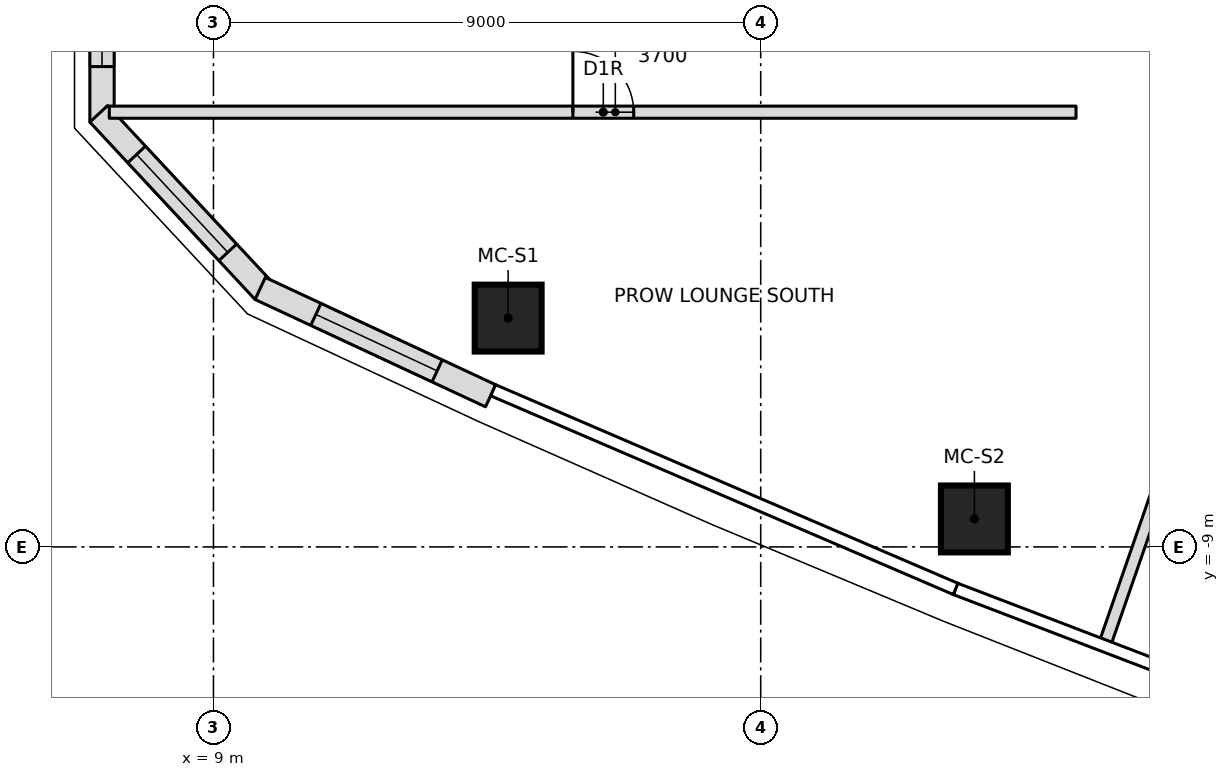
"""IFC4 building model, lengths in metres.
Left out: names, types, materials, properties, quantities, classifications, styles, units other than length and angle.
Written with IfcOpenShell. Run it as: python <this file> out.ifc"""

import sys

from ifc_helpers import new_model, si_unit, direction, frame, frame_2d, origin, origin_2d, place, context, subcontext, project, spatial, polyline, rectangle, outline, extrude, element, fill, save


model = new_model("IFC4")
c1 = context("Model", 3, precision=1e-05, world=origin(), true_north=direction((0.0, 1.0)))
c2 = subcontext(c1, "Body", "Model", "MODEL_VIEW")
j1 = project(units=[si_unit("LENGTHUNIT", "METRE"), si_unit("PLANEANGLEUNIT", "RADIAN")], contexts=[c1])
p1 = place(None, origin())
s1 = spatial("IfcSite", under=j1, at=p1, CompositionType="ELEMENT")
p2 = place(p1, origin())
s2 = spatial("IfcBuilding", under=s1, at=p2, CompositionType="ELEMENT")
p3 = place(p2, frame((0.0, 0.0, 292.75)))
s3 = spatial("IfcBuildingStorey", under=s2, at=p3, CompositionType="ELEMENT", Elevation=292.75)
for number, where, z_axis, x_axis in (
    (1, (13.846, -5.237, 0.0), (0.0, 0.0, 1.0), (1.0, 0.0, 0.0)),
    (2, (21.514, -8.54, 0.0), (0.0, 0.0, 1.0), (1.0, 0.0, 0.0)),
):
    element("IfcColumn", number, at=place(p3, frame(where, z_axis=z_axis, x_axis=x_axis)), inside=s3, PredefinedType="COLUMN", context=c2, shape_type="SweptSolid", body=[
        extrude(rectangle(XDim=1.1, YDim=1.1, at=origin_2d()), origin(), (0.0, 0.0, 1.0), 3.55),
    ])
p4 = place(p3, frame((7.167, 1.935, 0.0), z_axis=(0.0, 0.0, 1.0), x_axis=(0.0, -1.0, 0.0)))
e3 = element("IfcWall", 3, at=p4, inside=s3, PredefinedType="NOTDEFINED", context=c2, shape_type="SweptSolid", body=[
    extrude(outline(polyline([(-0.079, -0.2), (3.948, -0.2), (3.791, 0.2), (0.079, 0.2), (-0.079, -0.2)])), origin(), (0.0, 0.0, 1.0), 3.25),
])
p5 = place(p4, frame((0.835, 0.0, 0.6)))
e4 = element("IfcOpeningElement", 4, at=p5, cuts=e3, PredefinedType="OPENING", context=c2, shape_type="SweptSolid", body=[
    extrude(outline(polyline([(0.0, 1.35), (0.084, 1.771), (0.322, 2.128), (0.679, 2.366), (1.1, 2.45), (1.521, 2.366), (1.878, 2.128), (2.116, 1.771), (2.2, 1.35), (2.2, 1.1), (2.116, 0.679), (1.878, 0.322), (1.521, 0.084), (1.1, 0.0), (0.679, 0.084), (0.322, 0.322), (0.084, 0.679), (0.0, 1.1), (0.0, 1.35)])), frame((0.0, 0.21, 0.0), z_axis=(0.0, -1.0, 0.0), x_axis=(1.0, 0.0, 0.0)), (0.0, 0.0, 1.0), 0.42),
])
p6 = place(p3, frame((7.167, -1.935, 0.0), z_axis=(0.0, 0.0, 1.0), x_axis=(0.6815467277, -0.73177459505, 0.0)))
e5 = element("IfcWall", 5, at=p6, inside=s3, PredefinedType="NOTDEFINED", context=c2, shape_type="SweptSolid", body=[
    extrude(outline(polyline([(-0.079, -0.2), (3.908, -0.2), (3.83, 0.2), (0.079, 0.2), (-0.079, -0.2)])), origin(), (0.0, 0.0, 1.0), 3.25),
])
p7 = place(p6, frame((0.835, 0.0, 0.6)))
e6 = element("IfcOpeningElement", 6, at=p7, cuts=e5, PredefinedType="OPENING", context=c2, shape_type="SweptSolid", body=[
    extrude(outline(polyline([(0.0, 1.35), (0.084, 1.771), (0.322, 2.128), (0.679, 2.366), (1.1, 2.45), (1.521, 2.366), (1.878, 2.128), (2.116, 1.771), (2.2, 1.35), (2.2, 1.1), (2.116, 0.679), (1.878, 0.322), (1.521, 0.084), (1.1, 0.0), (0.679, 0.084), (0.322, 0.322), (0.084, 0.679), (0.0, 1.1), (0.0, 1.35)])), frame((0.0, 0.21, 0.0), z_axis=(0.0, -1.0, 0.0), x_axis=(1.0, 0.0, 0.0)), (0.0, 0.0, 1.0), 0.42),
])
p8 = place(p3, frame((9.804, -4.766, 0.0), z_axis=(0.0, 0.0, 1.0), x_axis=(0.906485602396, -0.42223672584, 0.0)))
e7 = element("IfcWall", 7, at=p8, inside=s3, PredefinedType="NOTDEFINED", context=c2, shape_type="SweptSolid", body=[
    extrude(outline(polyline([(-0.039, -0.2), (4.142, -0.2), (4.142, 0.2), (0.039, 0.2), (-0.039, -0.2)])), origin(), (0.0, 0.0, 1.0), 3.25),
])
p9 = place(p8, frame((0.971, 0.0, 0.6)))
e8 = element("IfcOpeningElement", 8, at=p9, cuts=e7, PredefinedType="OPENING", context=c2, shape_type="SweptSolid", body=[
    extrude(outline(polyline([(0.0, 1.35), (0.084, 1.771), (0.322, 2.128), (0.679, 2.366), (1.1, 2.45), (1.521, 2.366), (1.878, 2.128), (2.116, 1.771), (2.2, 1.35), (2.2, 1.1), (2.116, 0.679), (1.878, 0.322), (1.521, 0.084), (1.1, 0.0), (0.679, 0.084), (0.322, 0.322), (0.084, 0.679), (0.0, 1.1), (0.0, 1.35)])), frame((0.0, 0.21, 0.0), z_axis=(0.0, -1.0, 0.0), x_axis=(1.0, 0.0, 0.0)), (0.0, 0.0, 1.0), 0.42),
])
p10 = place(p3, frame((7.287, -1.85, 0.0), z_axis=(0.0, 0.0, 1.0), x_axis=(1.0, 0.0, 0.0)))
e9 = element("IfcWall", 9, at=p10, inside=s3, PredefinedType="PARTITIONING", context=c2, shape_type="SweptSolid", body=[
    extrude(rectangle(XDim=15.899, YDim=0.2, at=frame_2d((7.949, 0.0))), origin(), (0.0, 0.0, 1.0), 3.25),
])
p11 = place(p10, frame((7.624, 0.0, 0.0)))
e10 = element("IfcOpeningElement", 10, at=p11, cuts=e9, PredefinedType="OPENING", context=c2, shape_type="SweptSolid", body=[
    extrude(rectangle(XDim=1.0, YDim=2.1, at=frame_2d((0.5, 1.05))), frame((0.0, 0.11, 0.0), z_axis=(0.0, -1.0, 0.0), x_axis=(1.0, 0.0, 0.0)), (0.0, 0.0, 1.0), 0.22),
])
p12 = place(p3, frame((23.668, -10.573, 0.0), z_axis=(0.0, 0.0, 1.0), x_axis=(0.327714422317, 0.944776829418, 0.0)))
e11 = element("IfcWall", 11, at=p12, inside=s3, PredefinedType="PARTITIONING", context=c2, shape_type="SweptSolid", body=[
    extrude(rectangle(XDim=9.233, YDim=0.2, at=frame_2d((4.617, 0.0))), origin(), (0.0, 0.0, 1.0), 3.25),
])
p13 = place(p5, origin())
e12 = element("IfcWindow", 12, at=p13, inside=s3, PartitioningType="SINGLE_PANEL", PredefinedType="WINDOW", context=c2, shape_type="SweptSolid", body=[
    extrude(outline(polyline([(0.0, 1.35), (0.084, 1.771), (0.322, 2.128), (0.679, 2.366), (1.1, 2.45), (1.521, 2.366), (1.878, 2.128), (2.116, 1.771), (2.2, 1.35), (2.2, 1.1), (2.116, 0.679), (1.878, 0.322), (1.521, 0.084), (1.1, 0.0), (0.679, 0.084), (0.322, 0.322), (0.084, 0.679), (0.0, 1.1), (0.0, 1.35)])), frame((0.0, 0.17, 0.0), z_axis=(0.0, -1.0, 0.0), x_axis=(1.0, 0.0, 0.0)), (0.0, 0.0, 1.0), 0.06),
])
fill(e4, e12)
p14 = place(p7, origin())
e13 = element("IfcWindow", 13, at=p14, inside=s3, PartitioningType="SINGLE_PANEL", PredefinedType="WINDOW", context=c2, shape_type="SweptSolid", body=[
    extrude(outline(polyline([(0.0, 1.35), (0.084, 1.771), (0.322, 2.128), (0.679, 2.366), (1.1, 2.45), (1.521, 2.366), (1.878, 2.128), (2.116, 1.771), (2.2, 1.35), (2.2, 1.1), (2.116, 0.679), (1.878, 0.322), (1.521, 0.084), (1.1, 0.0), (0.679, 0.084), (0.322, 0.322), (0.084, 0.679), (0.0, 1.1), (0.0, 1.35)])), frame((0.0, 0.17, 0.0), z_axis=(0.0, -1.0, 0.0), x_axis=(1.0, 0.0, 0.0)), (0.0, 0.0, 1.0), 0.06),
])
fill(e6, e13)
p15 = place(p9, origin())
e14 = element("IfcWindow", 14, at=p15, inside=s3, PartitioningType="SINGLE_PANEL", PredefinedType="WINDOW", context=c2, shape_type="SweptSolid", body=[
    extrude(outline(polyline([(0.0, 1.35), (0.084, 1.771), (0.322, 2.128), (0.679, 2.366), (1.1, 2.45), (1.521, 2.366), (1.878, 2.128), (2.116, 1.771), (2.2, 1.35), (2.2, 1.1), (2.116, 0.679), (1.878, 0.322), (1.521, 0.084), (1.1, 0.0), (0.679, 0.084), (0.322, 0.322), (0.084, 0.679), (0.0, 1.1), (0.0, 1.35)])), frame((0.0, 0.17, 0.0), z_axis=(0.0, -1.0, 0.0), x_axis=(1.0, 0.0, 0.0)), (0.0, 0.0, 1.0), 0.06),
])
fill(e8, e14)
p16 = place(p11, origin())
e15 = element("IfcDoor", 15, at=p16, inside=s3, OperationType="SINGLE_SWING_RIGHT", PredefinedType="DOOR", context=c2, shape_type="SweptSolid", body=[
    extrude(rectangle(XDim=1.0, YDim=2.1, at=frame_2d((0.5, 1.05))), frame((0.0, 0.025, 0.0), z_axis=(0.0, -1.0, 0.0), x_axis=(1.0, 0.0, 0.0)), (0.0, 0.0, 1.0), 0.05),
])
fill(e10, e15)
save(model, sys.argv[1])
